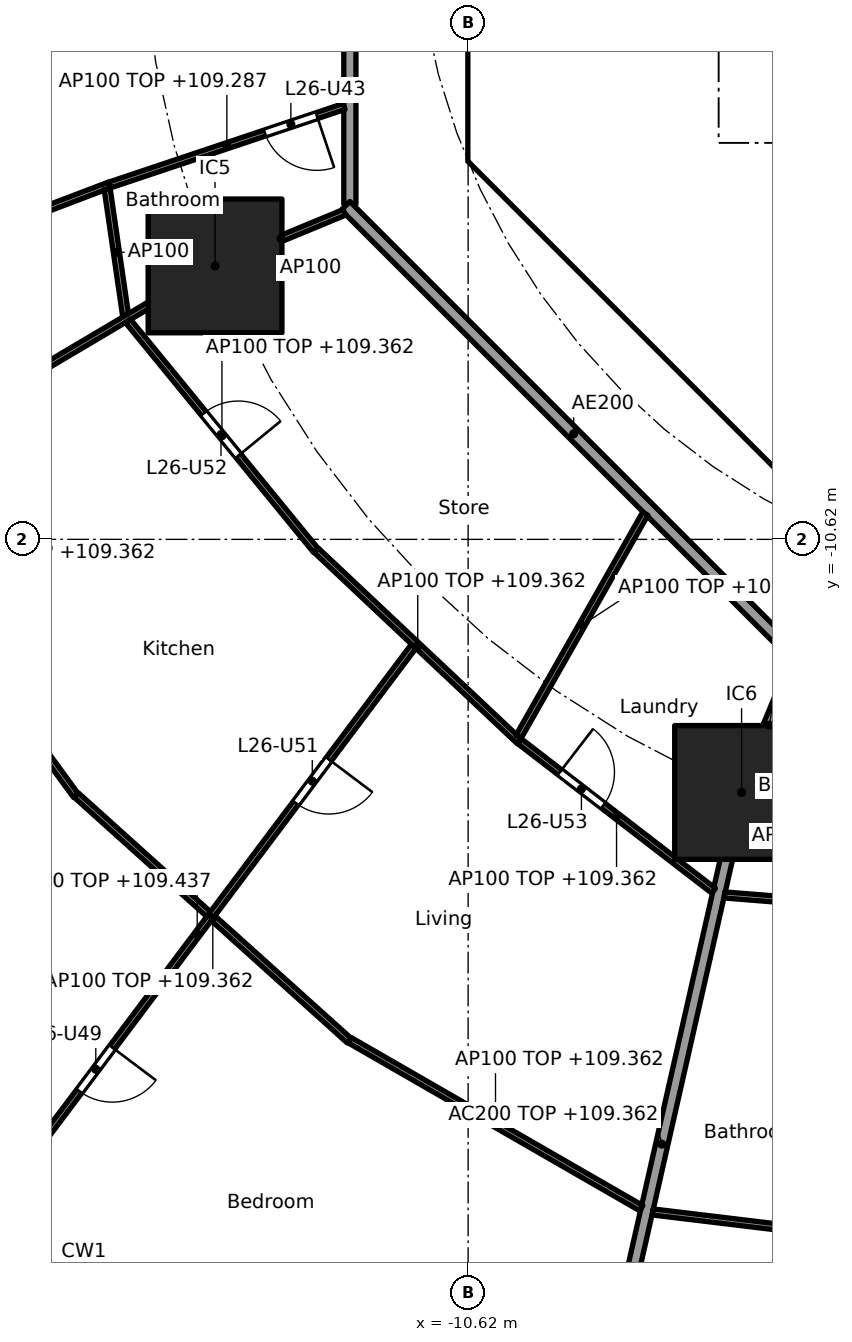
"""IFC4 building model, lengths in metres.
Left out: names, types, materials, properties, quantities, classifications, styles, units other than length and angle.
Written with IfcOpenShell. Run it as: python <this file> out.ifc"""

import sys

from ifc_helpers import new_model, si_unit, direction, frame, frame_2d, origin, origin_2d, place, context, subcontext, project, spatial, polyline, rectangle, outline, extrude, element, fill, save


model = new_model("IFC4")
c1 = context("Model", 3, precision=1e-05, world=origin(), true_north=direction((0.0, 1.0)))
c2 = subcontext(c1, "Body", "Model", "MODEL_VIEW")
j1 = project(units=[si_unit("LENGTHUNIT", "METRE"), si_unit("PLANEANGLEUNIT", "RADIAN")], contexts=[c1])
p1 = place(None, origin())
s1 = spatial("IfcSite", under=j1, at=p1, CompositionType="ELEMENT")
p2 = place(p1, origin())
s2 = spatial("IfcBuilding", under=s1, at=p2, CompositionType="ELEMENT")
p3 = place(p2, frame((0.0, 0.0, 106.6)))
s3 = spatial("IfcBuildingStorey", under=s2, at=p3, CompositionType="ELEMENT", Elevation=106.6)
for number, where, z_axis, x_axis in (
    (1, (-14.782, -6.123, 0.0), (0.0, 0.0, 1.0), (1.0, 0.0, 0.0)),
    (2, (-6.123, -14.782, 0.0), (0.0, 0.0, 1.0), (1.0, 0.0, 0.0)),
):
    element("IfcColumn", number, at=place(p3, frame(where, z_axis=z_axis, x_axis=x_axis)), inside=s3, PredefinedType="COLUMN", context=c2, shape_type="SweptSolid", body=[
        extrude(rectangle(XDim=2.2, YDim=2.2, at=origin_2d()), origin(), (0.0, 0.0, 1.0), 3.7),
    ])
p4 = place(p3, frame((-10.325, 3.801, 0.0), z_axis=(0.0, 0.0, 1.0), x_axis=(0.0, -1.0, 0.0)))
e3 = element("IfcWall", 3, at=p4, inside=s3, PredefinedType="SHEAR", context=c2, shape_type="SweptSolid", body=[
    extrude(rectangle(XDim=7.602, YDim=0.6, at=frame_2d((3.801, 0.0))), origin(), (0.0, 0.0, 1.0), 3.44),
])
p5 = place(p4, frame((0.651, 0.0, 0.0)))
e4 = element("IfcOpeningElement", 4, at=p5, cuts=e3, PredefinedType="OPENING", context=c2, shape_type="SweptSolid", body=[
    extrude(rectangle(XDim=1.5, YDim=2.1, at=frame_2d((0.75, 1.05))), frame((0.0, 0.31, 0.0), z_axis=(0.0, -1.0, 0.0), x_axis=(1.0, 0.0, 0.0)), (0.0, 0.0, 1.0), 0.62),
])
p6 = place(p4, frame((5.451, 0.0, 0.0)))
e5 = element("IfcOpeningElement", 5, at=p6, cuts=e3, PredefinedType="OPENING", context=c2, shape_type="SweptSolid", body=[
    extrude(rectangle(XDim=1.5, YDim=2.1, at=frame_2d((0.75, 1.05))), frame((0.0, 0.31, 0.0), z_axis=(0.0, -1.0, 0.0), x_axis=(1.0, 0.0, 0.0)), (0.0, 0.0, 1.0), 0.62),
])
p7 = place(p3, frame((-9.988, -4.613, 0.0), z_axis=(0.0, 0.0, 1.0), x_axis=(0.707106781187, -0.707106781187, 0.0)))
e6 = element("IfcWall", 6, at=p7, inside=s3, PredefinedType="SHEAR", context=c2, shape_type="SweptSolid", body=[
    extrude(rectangle(XDim=7.602, YDim=0.6, at=frame_2d((3.801, 0.0))), origin(), (0.0, 0.0, 1.0), 3.44),
])
p8 = place(p7, frame((6.151, 0.0, 0.0)))
e7 = element("IfcOpeningElement", 7, at=p8, cuts=e6, PredefinedType="OPENING", context=c2, shape_type="SweptSolid", body=[
    extrude(rectangle(XDim=1.1, YDim=2.1, at=frame_2d((0.55, 1.05))), frame((0.0, 0.31, 0.0), z_axis=(0.0, -1.0, 0.0), x_axis=(1.0, 0.0, 0.0)), (0.0, 0.0, 1.0), 0.62),
])
p9 = place(p3, frame((-5.8, -8.227, 0.0), z_axis=(0.0, 0.0, 1.0), x_axis=(0.0, 1.0, 0.0)))
e8 = element("IfcWall", 8, at=p9, inside=s3, PredefinedType="PARTITIONING", context=c2, shape_type="SweptSolid", body=[
    extrude(rectangle(XDim=3.927, YDim=0.15, at=frame_2d((1.963, 0.0))), origin(), (0.0, 0.0, 1.0), 3.44),
])
p10 = place(p9, frame((2.615, 0.0, 0.0)))
e9 = element("IfcOpeningElement", 9, at=p10, cuts=e8, PredefinedType="OPENING", context=c2, shape_type="SweptSolid", body=[
    extrude(rectangle(XDim=0.9, YDim=2.1, at=frame_2d((0.45, 1.05))), frame((0.0, 0.085, 0.0), z_axis=(0.0, -1.0, 0.0), x_axis=(1.0, 0.0, 0.0)), (0.0, 0.0, 1.0), 0.17),
])
p11 = place(p9, frame((0.539, 0.0, 0.0)))
e10 = element("IfcOpeningElement", 10, at=p11, cuts=e8, PredefinedType="OPENING", context=c2, shape_type="SweptSolid", body=[
    extrude(rectangle(XDim=0.9, YDim=2.1, at=frame_2d((0.45, 1.05))), frame((0.0, 0.085, 0.0), z_axis=(0.0, -1.0, 0.0), x_axis=(1.0, 0.0, 0.0)), (0.0, 0.0, 1.0), 0.17),
])
p12 = place(p3, origin())
e11 = element("IfcWall", 11, at=p12, inside=s3, PredefinedType="SHEAR", context=c2, shape_type="SweptSolid", body=[
    extrude(outline(polyline([(-10.625, -3.801), (-10.025, -3.801), (-10.025, -4.152), (-9.776, -4.401), (-10.2, -4.825), (-10.625, -4.401), (-10.625, -3.801)])), origin(), (0.0, 0.0, 1.0), 3.44),
])
p13 = place(p3, frame((-10.025, -4.0, 0.0), z_axis=(0.0, 0.0, 1.0), x_axis=(1.0, 0.0, 0.0)))
e12 = element("IfcWall", 12, at=p13, inside=s3, PredefinedType="PARTITIONING", context=c2, shape_type="SweptSolid", body=[
    extrude(rectangle(XDim=3.325, YDim=0.2, at=frame_2d((1.662, 0.0))), origin(), (0.0, 0.0, 1.0), 3.44),
])
p14 = place(p3, frame((-8.001, -6.1, 0.0), z_axis=(0.0, 0.0, 1.0), x_axis=(1.0, 0.0, 0.0)))
e13 = element("IfcWall", 13, at=p14, inside=s3, PredefinedType="PARTITIONING", context=c2, shape_type="SweptSolid", body=[
    extrude(rectangle(XDim=2.126, YDim=0.15, at=frame_2d((1.063, 0.0))), origin(), (0.0, 0.0, 1.0), 3.44),
])
p15 = place(p3, origin())
e14 = element("IfcWall", 14, at=p15, inside=s3, PredefinedType="SOLIDWALL", context=c2, shape_type="SweptSolid", body=[
    extrude(outline(polyline([(-6.7, -2.1), (-6.5, -2.1), (-6.5, -4.1), (-4.5, -4.1), (-4.5, -2.1), (-4.3, -2.1), (-4.3, -4.1), (-2.3, -4.1), (-2.3, -2.1), (-2.1, -2.1), (-2.1, -4.1), (-0.1, -4.1), (-0.1, -2.1), (0.1, -2.1), (0.1, -4.1), (2.1, -4.1), (2.1, -2.1), (2.3, -2.1), (2.3, -4.1), (4.3, -4.1), (4.3, -2.1), (4.5, -2.1), (4.5, -4.1), (6.5, -4.1), (6.5, -2.1), (6.7, -2.1), (6.7, -4.3), (-6.7, -4.3), (-6.7, -2.1)])), origin(), (0.0, 0.0, 1.0), 3.44),
])
p16 = place(p3, frame((-5.243, -12.657, 0.0), z_axis=(0.0, 0.0, 1.0), x_axis=(-0.382668627144, -0.923885664896, 0.0)))
e15 = element("IfcWall", 15, at=p16, inside=s3, PredefinedType="PARTITIONING", context=c2, shape_type="SweptSolid", body=[
    extrude(rectangle(XDim=2.2, YDim=0.2, at=frame_2d((1.1, 0.0))), origin(), (0.0, 0.0, 1.0), 3.44),
])
p17 = place(p3, frame((-6.134, -14.831, 0.0), z_axis=(0.0, 0.0, 1.0), x_axis=(-0.221225405869, -0.975222702667, 0.0)))
e16 = element("IfcWall", 16, at=p17, inside=s3, PredefinedType="PARTITIONING", context=c2, shape_type="SweptSolid", body=[
    extrude(rectangle(XDim=11.761, YDim=0.2, at=frame_2d((5.88, 0.0))), origin(), (0.0, 0.0, 1.0), 2.762),
])
p18 = place(p3, frame((-12.565, 5.304, 0.0), z_axis=(0.0, 0.0, 1.0), x_axis=(0.0, -1.0, 0.0)))
e17 = element("IfcWall", 17, at=p18, inside=s3, PredefinedType="PARTITIONING", context=c2, shape_type="SweptSolid", body=[
    extrude(rectangle(XDim=10.409, YDim=0.2, at=frame_2d((5.205, 0.0))), origin(), (0.0, 0.0, 1.0), 3.44),
])
p19 = place(p18, frame((6.539, 0.0, 0.0)))
e18 = element("IfcOpeningElement", 18, at=p19, cuts=e17, PredefinedType="OPENING", context=c2, shape_type="SweptSolid", body=[
    extrude(rectangle(XDim=1.0, YDim=2.1, at=frame_2d((0.5, 1.05))), frame((0.0, 0.11, 0.0), z_axis=(0.0, -1.0, 0.0), x_axis=(1.0, 0.0, 0.0)), (0.0, 0.0, 1.0), 0.22),
])
p20 = place(p3, frame((-12.635, -5.134, 0.0), z_axis=(0.0, 0.0, 1.0), x_axis=(0.707106781187, -0.707106781187, 0.0)))
e19 = element("IfcWall", 19, at=p20, inside=s3, PredefinedType="PARTITIONING", context=c2, shape_type="SweptSolid", body=[
    extrude(rectangle(XDim=10.609, YDim=0.2, at=frame_2d((5.305, 0.0))), origin(), (0.0, 0.0, 1.0), 3.44),
])
p21 = place(p3, frame((-12.66, -3.501, 0.0), z_axis=(0.0, 0.0, 1.0), x_axis=(-0.94826823584, -0.317470239387, 0.0)))
e20 = element("IfcWall", 20, at=p21, inside=s3, PredefinedType="PARTITIONING", context=c2, shape_type="SweptSolid", body=[
    extrude(rectangle(XDim=4.067, YDim=0.1, at=frame_2d((2.033, 0.0))), origin(), (0.0, 0.0, 1.0), 2.687),
])
p22 = place(p21, frame((0.473, 0.0, 0.0)))
e21 = element("IfcOpeningElement", 21, at=p22, cuts=e20, PredefinedType="OPENING", context=c2, shape_type="SweptSolid", body=[
    extrude(rectangle(XDim=0.9, YDim=2.1, at=frame_2d((0.45, 1.05))), frame((0.0, 0.06, 0.0), z_axis=(0.0, -1.0, 0.0), x_axis=(1.0, 0.0, 0.0)), (0.0, 0.0, 1.0), 0.12),
])
p23 = place(p3, frame((-16.517, -4.791, 0.0), z_axis=(0.0, 0.0, 1.0), x_axis=(-0.934746314445, -0.355315813933, 0.0)))
e22 = element("IfcWall", 22, at=p23, inside=s3, PredefinedType="PARTITIONING", context=c2, shape_type="SweptSolid", body=[
    extrude(rectangle(XDim=5.439, YDim=0.1, at=frame_2d((2.72, 0.0))), origin(), (0.0, 0.0, 1.0), 3.44),
])
p24 = place(p23, frame((2.295, 0.0, 0.0)))
e23 = element("IfcOpeningElement", 23, at=p24, cuts=e22, PredefinedType="OPENING", context=c2, shape_type="SweptSolid", body=[
    extrude(rectangle(XDim=0.9, YDim=2.1, at=frame_2d((0.45, 1.05))), frame((0.0, 0.06, 0.0), z_axis=(0.0, -1.0, 0.0), x_axis=(1.0, 0.0, 0.0)), (0.0, 0.0, 1.0), 0.12),
])
p25 = place(p3, frame((-16.556, -4.858, 0.0), z_axis=(0.0, 0.0, 1.0), x_axis=(0.144198032946, -0.989548850383, 0.0)))
e24 = element("IfcWall", 24, at=p25, inside=s3, PredefinedType="PARTITIONING", context=c2, shape_type="SweptSolid", body=[
    extrude(rectangle(XDim=2.104, YDim=0.1, at=frame_2d((1.052, 0.0))), origin(), (0.0, 0.0, 1.0), 3.44),
])
p26 = place(p3, frame((-12.657, -5.243, 0.0), z_axis=(0.0, 0.0, 1.0), x_axis=(-0.923848837015, -0.382757529444, 0.0)))
e25 = element("IfcWall", 25, at=p26, inside=s3, PredefinedType="PARTITIONING", context=c2, shape_type="SweptSolid", body=[
    extrude(rectangle(XDim=2.25, YDim=0.1, at=frame_2d((1.125, 0.0))), origin(), (0.0, 0.0, 1.0), 3.44),
])
p27 = place(p3, frame((-14.825, -6.148, 0.0), z_axis=(0.0, 0.0, 1.0), x_axis=(-0.860400431487, -0.509618580408, 0.0)))
e26 = element("IfcWall", 26, at=p27, inside=s3, PredefinedType="PARTITIONING", context=c2, shape_type="SweptSolid", body=[
    extrude(rectangle(XDim=11.688, YDim=0.1, at=frame_2d((5.844, 0.0))), origin(), (0.0, 0.0, 1.0), 2.762),
])
p28 = place(p27, frame((8.877, 0.0, 0.0)))
e27 = element("IfcOpeningElement", 27, at=p28, cuts=e26, PredefinedType="OPENING", context=c2, shape_type="SweptSolid", body=[
    extrude(rectangle(XDim=0.9, YDim=2.1, at=frame_2d((0.45, 1.05))), frame((0.0, 0.06, 0.0), z_axis=(0.0, -1.0, 0.0), x_axis=(1.0, 0.0, 0.0)), (0.0, 0.0, 1.0), 0.12),
])
p29 = place(p3, frame((-16.214, -7.028, 0.0), z_axis=(0.0, 0.0, 1.0), x_axis=(0.633412158846, -0.773814601197, 0.0)))
e28 = element("IfcWall", 28, at=p29, inside=s3, PredefinedType="PARTITIONING", context=c2, shape_type="SweptSolid", body=[
    extrude(rectangle(XDim=4.879, YDim=0.1, at=frame_2d((2.439, 0.0))), origin(), (0.0, 0.0, 1.0), 2.762),
])
p30 = place(p29, frame((1.965, 0.0, 0.0)))
e29 = element("IfcOpeningElement", 29, at=p30, cuts=e28, PredefinedType="OPENING", context=c2, shape_type="SweptSolid", body=[
    extrude(rectangle(XDim=0.9, YDim=2.1, at=frame_2d((0.45, 1.05))), frame((0.0, 0.06, 0.0), z_axis=(0.0, -1.0, 0.0), x_axis=(1.0, 0.0, 0.0)), (0.0, 0.0, 1.0), 0.12),
])
p31 = place(p3, frame((-20.79, -9.739, 0.0), z_axis=(0.0, 0.0, 1.0), x_axis=(0.589595343438, -0.807698787294, 0.0)))
e30 = element("IfcWall", 30, at=p31, inside=s3, PredefinedType="PARTITIONING", context=c2, shape_type="SweptSolid", body=[
    extrude(rectangle(XDim=6.308, YDim=0.1, at=frame_2d((3.154, 0.0))), origin(), (0.0, 0.0, 1.0), 2.762),
])
p32 = place(p31, frame((2.679, 0.0, 0.0)))
e31 = element("IfcOpeningElement", 31, at=p32, cuts=e30, PredefinedType="OPENING", context=c2, shape_type="SweptSolid", body=[
    extrude(rectangle(XDim=0.9, YDim=2.1, at=frame_2d((0.45, 1.05))), frame((0.0, 0.06, 0.0), z_axis=(0.0, -1.0, 0.0), x_axis=(1.0, 0.0, 0.0)), (0.0, 0.0, 1.0), 0.12),
])
p33 = place(p3, frame((-13.118, -10.8, 0.0), z_axis=(0.0, 0.0, 1.0), x_axis=(0.72818280142, -0.685382964273, 0.0)))
e32 = element("IfcWall", 32, at=p33, inside=s3, PredefinedType="PARTITIONING", context=c2, shape_type="SweptSolid", body=[
    extrude(rectangle(XDim=4.586, YDim=0.1, at=frame_2d((2.293, 0.0))), origin(), (0.0, 0.0, 1.0), 2.762),
])
p34 = place(p3, frame((-17.063, -14.827, 0.0), z_axis=(0.0, 0.0, 1.0), x_axis=(0.743485143578, -0.668752451419, 0.0)))
e33 = element("IfcWall", 33, at=p34, inside=s3, PredefinedType="PARTITIONING", context=c2, shape_type="SweptSolid", body=[
    extrude(rectangle(XDim=6.037, YDim=0.1, at=frame_2d((3.019, 0.0))), origin(), (0.0, 0.0, 1.0), 2.762),
])
p35 = place(p3, frame((-11.515, -12.377, 0.0), z_axis=(0.0, 0.0, 1.0), x_axis=(-0.600741245554, -0.799443528893, 0.0)))
e34 = element("IfcWall", 34, at=p35, inside=s3, PredefinedType="PARTITIONING", context=c2, shape_type="SweptSolid", body=[
    extrude(rectangle(XDim=11.853, YDim=0.1, at=frame_2d((5.927, 0.0))), origin(), (0.0, 0.0, 1.0), 2.837),
])
p36 = place(p35, frame((8.253, 0.0, 0.0)))
e35 = element("IfcOpeningElement", 35, at=p36, cuts=e34, PredefinedType="OPENING", context=c2, shape_type="SweptSolid", body=[
    extrude(rectangle(XDim=0.9, YDim=2.1, at=frame_2d((0.45, 1.05))), frame((0.0, 0.06, 0.0), z_axis=(0.0, -1.0, 0.0), x_axis=(1.0, 0.0, 0.0)), (0.0, 0.0, 1.0), 0.12),
])
p37 = place(p35, frame((2.326, 0.0, 0.0)))
e36 = element("IfcOpeningElement", 36, at=p37, cuts=e34, PredefinedType="OPENING", context=c2, shape_type="SweptSolid", body=[
    extrude(rectangle(XDim=0.9, YDim=2.1, at=frame_2d((0.45, 1.05))), frame((0.0, 0.06, 0.0), z_axis=(0.0, -1.0, 0.0), x_axis=(1.0, 0.0, 0.0)), (0.0, 0.0, 1.0), 0.12),
])
p38 = place(p3, frame((-7.707, -10.198, 0.0), z_axis=(0.0, 0.0, 1.0), x_axis=(-0.493986531217, -0.869469554945, 0.0)))
e37 = element("IfcWall", 37, at=p38, inside=s3, PredefinedType="PARTITIONING", context=c2, shape_type="SweptSolid", body=[
    extrude(rectangle(XDim=4.217, YDim=0.1, at=frame_2d((2.109, 0.0))), origin(), (0.0, 0.0, 1.0), 2.687),
])
p39 = place(p3, frame((-9.775, -13.939, 0.0), z_axis=(0.0, 0.0, 1.0), x_axis=(0.792162117554, -0.610310723741, 0.0)))
e38 = element("IfcWall", 38, at=p39, inside=s3, PredefinedType="PARTITIONING", context=c2, shape_type="SweptSolid", body=[
    extrude(rectangle(XDim=4.03, YDim=0.1, at=frame_2d((2.015, 0.0))), origin(), (0.0, 0.0, 1.0), 2.762),
])
p40 = place(p39, frame((0.836, 0.0, 0.0)))
e39 = element("IfcOpeningElement", 39, at=p40, cuts=e38, PredefinedType="OPENING", context=c2, shape_type="SweptSolid", body=[
    extrude(rectangle(XDim=0.9, YDim=2.1, at=frame_2d((0.45, 1.05))), frame((0.0, 0.06, 0.0), z_axis=(0.0, -1.0, 0.0), x_axis=(1.0, 0.0, 0.0)), (0.0, 0.0, 1.0), 0.12),
])
p41 = place(p3, frame((-12.568, -18.856, 0.0), z_axis=(0.0, 0.0, 1.0), x_axis=(0.866533437451, -0.499119025664, 0.0)))
e40 = element("IfcWall", 40, at=p41, inside=s3, PredefinedType="PARTITIONING", context=c2, shape_type="SweptSolid", body=[
    extrude(rectangle(XDim=5.535, YDim=0.1, at=frame_2d((2.768, 0.0))), origin(), (0.0, 0.0, 1.0), 2.762),
])
p42 = place(p3, frame((-6.404, -16.468, 0.0), z_axis=(0.0, 0.0, 1.0), x_axis=(0.996819101134, -0.079697425392, 0.0)))
e41 = element("IfcWall", 41, at=p42, inside=s3, PredefinedType="PARTITIONING", context=c2, shape_type="SweptSolid", body=[
    extrude(rectangle(XDim=2.233, YDim=0.1, at=frame_2d((1.117, 0.0))), origin(), (0.0, 0.0, 1.0), 2.762),
])
p43 = place(p3, frame((-7.586, -21.68, 0.0), z_axis=(0.0, 0.0, 1.0), x_axis=(0.992810535213, -0.119696454295, 0.0)))
e42 = element("IfcWall", 42, at=p43, inside=s3, PredefinedType="PARTITIONING", context=c2, shape_type="SweptSolid", body=[
    extrude(rectangle(XDim=5.903, YDim=0.1, at=frame_2d((2.951, 0.0))), origin(), (0.0, 0.0, 1.0), 2.762),
])
p44 = place(p43, frame((3.915, 0.0, 0.0)))
e43 = element("IfcOpeningElement", 43, at=p44, cuts=e42, PredefinedType="OPENING", context=c2, shape_type="SweptSolid", body=[
    extrude(rectangle(XDim=0.9, YDim=2.1, at=frame_2d((0.45, 1.05))), frame((0.0, 0.06, 0.0), z_axis=(0.0, -1.0, 0.0), x_axis=(1.0, 0.0, 0.0)), (0.0, 0.0, 1.0), 0.12),
])
p45 = place(p10, origin())
e44 = element("IfcDoor", 44, at=p45, inside=s3, OperationType="SINGLE_SWING_RIGHT", PredefinedType="DOOR", context=c2, shape_type="SweptSolid", body=[
    extrude(rectangle(XDim=0.9, YDim=2.1, at=frame_2d((0.45, 1.05))), frame((0.0, 0.025, 0.0), z_axis=(0.0, -1.0, 0.0), x_axis=(1.0, 0.0, 0.0)), (0.0, 0.0, 1.0), 0.05),
])
fill(e9, e44)
p46 = place(p11, origin())
e45 = element("IfcDoor", 45, at=p46, inside=s3, OperationType="SINGLE_SWING_RIGHT", PredefinedType="DOOR", context=c2, shape_type="SweptSolid", body=[
    extrude(rectangle(XDim=0.9, YDim=2.1, at=frame_2d((0.45, 1.05))), frame((0.0, 0.025, 0.0), z_axis=(0.0, -1.0, 0.0), x_axis=(1.0, 0.0, 0.0)), (0.0, 0.0, 1.0), 0.05),
])
fill(e10, e45)
p47 = place(p6, origin())
e46 = element("IfcDoor", 46, at=p47, inside=s3, OperationType="DOUBLE_DOOR_SINGLE_SWING", PredefinedType="DOOR", context=c2, shape_type="SweptSolid", body=[
    extrude(rectangle(XDim=1.5, YDim=2.1, at=frame_2d((0.75, 1.05))), frame((0.0, 0.025, 0.0), z_axis=(0.0, -1.0, 0.0), x_axis=(1.0, 0.0, 0.0)), (0.0, 0.0, 1.0), 0.05),
])
fill(e5, e46)
p48 = place(p8, origin())
e47 = element("IfcDoor", 47, at=p48, inside=s3, OperationType="SINGLE_SWING_RIGHT", PredefinedType="DOOR", context=c2, shape_type="SweptSolid", body=[
    extrude(rectangle(XDim=1.1, YDim=2.1, at=frame_2d((0.55, 1.05))), frame((0.0, 0.025, 0.0), z_axis=(0.0, -1.0, 0.0), x_axis=(1.0, 0.0, 0.0)), (0.0, 0.0, 1.0), 0.05),
])
fill(e7, e47)
p49 = place(p22, origin())
e48 = element("IfcDoor", 48, at=p49, inside=s3, OperationType="SINGLE_SWING_LEFT", PredefinedType="DOOR", context=c2, shape_type="SweptSolid", body=[
    extrude(rectangle(XDim=0.9, YDim=2.1, at=frame_2d((0.45, 1.05))), frame((0.0, 0.025, 0.0), z_axis=(0.0, -1.0, 0.0), x_axis=(1.0, 0.0, 0.0)), (0.0, 0.0, 1.0), 0.05),
])
fill(e21, e48)
p50 = place(p36, origin())
e49 = element("IfcDoor", 49, at=p50, inside=s3, OperationType="SINGLE_SWING_LEFT", PredefinedType="DOOR", context=c2, shape_type="SweptSolid", body=[
    extrude(rectangle(XDim=0.9, YDim=2.1, at=frame_2d((0.45, 1.05))), frame((0.0, 0.025, 0.0), z_axis=(0.0, -1.0, 0.0), x_axis=(1.0, 0.0, 0.0)), (0.0, 0.0, 1.0), 0.05),
])
fill(e35, e49)
p51 = place(p37, origin())
e50 = element("IfcDoor", 50, at=p51, inside=s3, OperationType="SINGLE_SWING_LEFT", PredefinedType="DOOR", context=c2, shape_type="SweptSolid", body=[
    extrude(rectangle(XDim=0.9, YDim=2.1, at=frame_2d((0.45, 1.05))), frame((0.0, 0.025, 0.0), z_axis=(0.0, -1.0, 0.0), x_axis=(1.0, 0.0, 0.0)), (0.0, 0.0, 1.0), 0.05),
])
fill(e36, e50)
p52 = place(p30, origin())
e51 = element("IfcDoor", 51, at=p52, inside=s3, OperationType="SINGLE_SWING_RIGHT", PredefinedType="DOOR", context=c2, shape_type="SweptSolid", body=[
    extrude(rectangle(XDim=0.9, YDim=2.1, at=frame_2d((0.45, 1.05))), frame((0.0, 0.025, 0.0), z_axis=(0.0, -1.0, 0.0), x_axis=(1.0, 0.0, 0.0)), (0.0, 0.0, 1.0), 0.05),
])
fill(e29, e51)
p53 = place(p40, origin())
e52 = element("IfcDoor", 52, at=p53, inside=s3, OperationType="SINGLE_SWING_LEFT", PredefinedType="DOOR", context=c2, shape_type="SweptSolid", body=[
    extrude(rectangle(XDim=0.9, YDim=2.1, at=frame_2d((0.45, 1.05))), frame((0.0, 0.025, 0.0), z_axis=(0.0, -1.0, 0.0), x_axis=(1.0, 0.0, 0.0)), (0.0, 0.0, 1.0), 0.05),
])
fill(e39, e52)
save(model, sys.argv[1])
